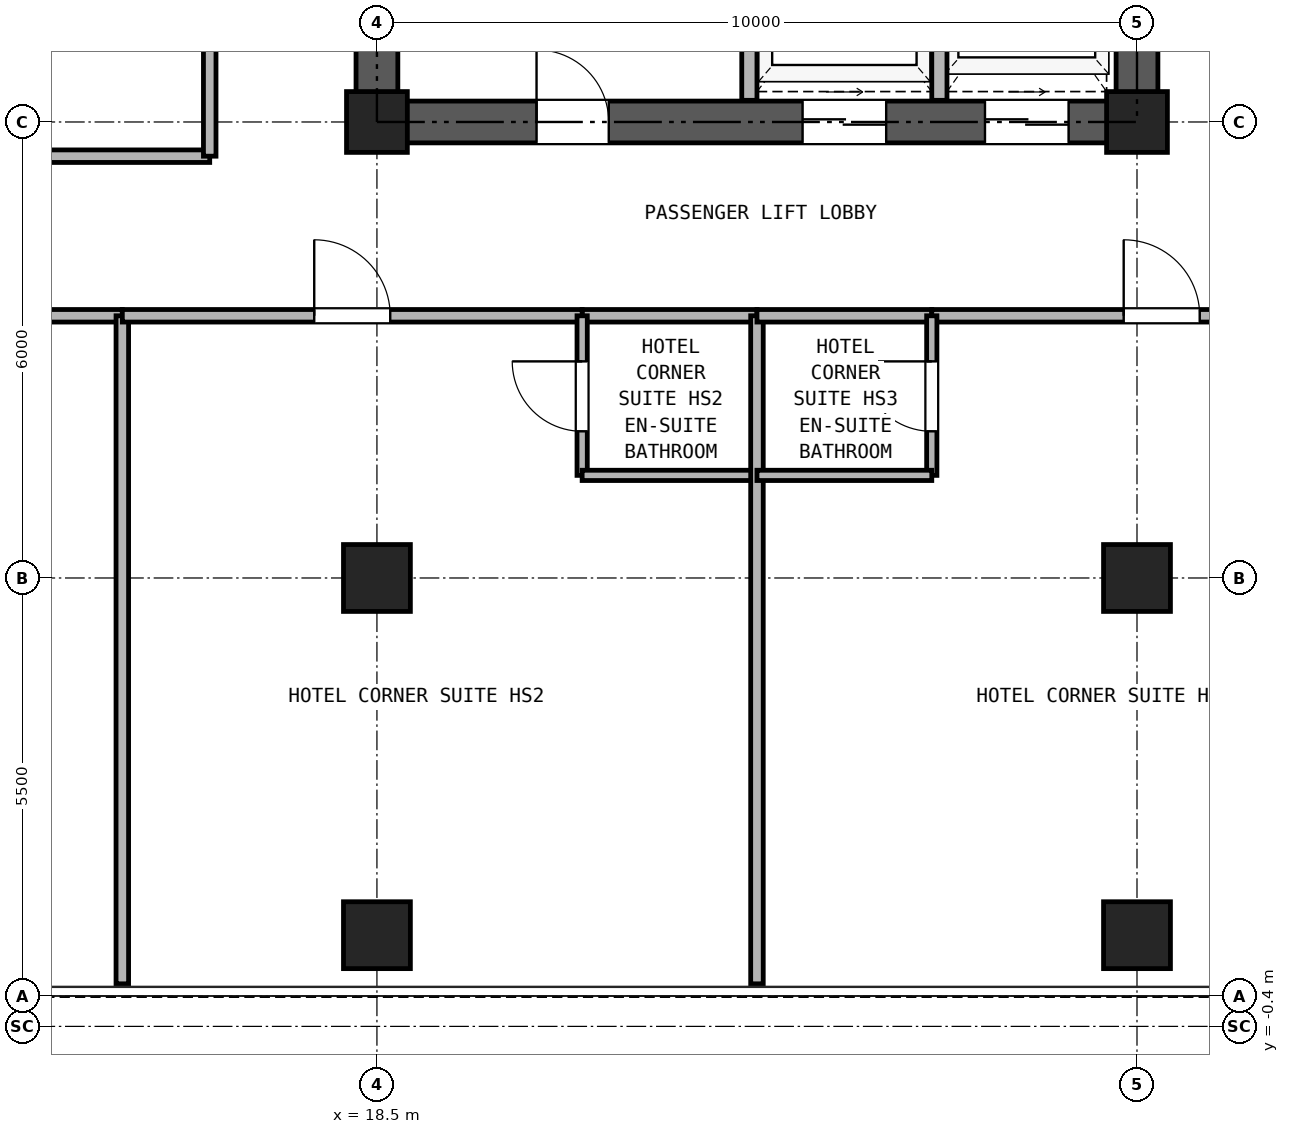
"""IFC4 building model, lengths in metres.
Left out: names, types, materials, properties, quantities, classifications, styles, units other than length and angle.
Written with IfcOpenShell. Run it as: python <this file> out.ifc"""

import sys

from ifc_helpers import new_model, si_unit, direction, frame, frame_2d, origin, origin_2d, place, context, subcontext, project, spatial, rectangle, hollow_rectangle, extrude, source, transform, mapped, element, fill, save


model = new_model("IFC4")
c1 = context("Model", 3, precision=1e-05, world=origin(), true_north=direction((0.0, 1.0)))
c2 = subcontext(c1, "Body", "Model", "MODEL_VIEW")
j1 = project(units=[si_unit("LENGTHUNIT", "METRE"), si_unit("PLANEANGLEUNIT", "RADIAN")], contexts=[c1])
p1 = place(None, origin())
s1 = spatial("IfcSite", under=j1, at=p1, CompositionType="ELEMENT")
p2 = place(p1, origin())
s2 = spatial("IfcBuilding", under=s1, at=p2, CompositionType="ELEMENT")
p3 = place(p2, frame((0.0, 0.0, 95.9)))
s3 = spatial("IfcBuildingStorey", under=s2, at=p3, CompositionType="ELEMENT", Elevation=95.9)
m1 = source(origin(), c2, "Body", "SweptSolid", [
    extrude(hollow_rectangle(XDim=0.88, YDim=0.88, WallThickness=0.05, at=origin_2d()), origin(), (0.0, 0.0, 1.0), 2.95),
])
for number, where, z_axis, x_axis in (
    (1, (18.5, 0.8, 0.0), (0.0, 0.0, 1.0), (1.0, 0.0, 0.0)),
    (2, (28.5, 0.8, 0.0), (0.0, 0.0, 1.0), (1.0, 0.0, 0.0)),
    (3, (18.5, 5.5, 0.0), (0.0, 0.0, 1.0), (1.0, 0.0, 0.0)),
):
    element("IfcColumn", number, at=place(p3, frame(where, z_axis=z_axis, x_axis=x_axis)), inside=s3, PredefinedType="COLUMN", context=c2, shape_type="MappedRepresentation", body=[
        mapped(m1, transform((0.0, 0.0, 0.0), x_axis=(1.0, 0.0, 0.0), y_axis=(0.0, 1.0, 0.0), z_axis=(0.0, 0.0, 1.0), scale=1.0)),
    ])
m2 = source(origin(), c2, "Body", "SweptSolid", [
    extrude(hollow_rectangle(XDim=0.8, YDim=0.8, WallThickness=0.045, at=origin_2d()), origin(), (0.0, 0.0, 1.0), 2.95),
])
p4 = place(p3, frame((18.5, 11.5, 0.0), z_axis=(0.0, 0.0, 1.0), x_axis=(1.0, 0.0, 0.0)))
e4 = element("IfcColumn", 4, at=p4, inside=s3, PredefinedType="COLUMN", context=c2, shape_type="MappedRepresentation", body=[
    mapped(m2, transform((0.0, 0.0, 0.0), x_axis=(1.0, 0.0, 0.0), y_axis=(0.0, 1.0, 0.0), z_axis=(0.0, 0.0, 1.0), scale=1.0)),
])
p5 = place(p3, frame((28.5, 5.5, 0.0), z_axis=(0.0, 0.0, 1.0), x_axis=(1.0, 0.0, 0.0)))
e5 = element("IfcColumn", 5, at=p5, inside=s3, PredefinedType="COLUMN", context=c2, shape_type="MappedRepresentation", body=[
    mapped(m1, transform((0.0, 0.0, 0.0), x_axis=(1.0, 0.0, 0.0), y_axis=(0.0, 1.0, 0.0), z_axis=(0.0, 0.0, 1.0), scale=1.0)),
])
p6 = place(p3, frame((28.5, 11.5, 0.0), z_axis=(0.0, 0.0, 1.0), x_axis=(1.0, 0.0, 0.0)))
e6 = element("IfcColumn", 6, at=p6, inside=s3, PredefinedType="COLUMN", context=c2, shape_type="MappedRepresentation", body=[
    mapped(m2, transform((0.0, 0.0, 0.0), x_axis=(1.0, 0.0, 0.0), y_axis=(0.0, 1.0, 0.0), z_axis=(0.0, 0.0, 1.0), scale=1.0)),
])
p7 = place(p3, frame((18.225, 11.5, 0.0), z_axis=(0.0, 0.0, 1.0), x_axis=(1.0, 0.0, 0.0)))
e7 = element("IfcWall", 7, at=p7, inside=s3, PredefinedType="SHEAR", context=c2, shape_type="SweptSolid", body=[
    extrude(rectangle(XDim=10.55, YDim=0.55, at=frame_2d((5.275, 0.0))), origin(), (0.0, 0.0, 1.0), 2.95),
])
p8 = place(p7, frame((2.375, 0.0, 0.0)))
e8 = element("IfcOpeningElement", 8, at=p8, cuts=e7, PredefinedType="OPENING", context=c2, shape_type="SweptSolid", body=[
    extrude(rectangle(XDim=0.95, YDim=2.15, at=frame_2d((0.475, 1.075))), frame((0.0, 0.285, 0.0), z_axis=(0.0, -1.0, 0.0), x_axis=(1.0, 0.0, 0.0)), (0.0, 0.0, 1.0), 0.57),
])
p9 = place(p7, frame((5.875, 0.0, 0.0)))
e9 = element("IfcOpeningElement", 9, at=p9, cuts=e7, PredefinedType="OPENING", context=c2, shape_type="SweptSolid", body=[
    extrude(rectangle(XDim=1.1, YDim=2.25, at=frame_2d((0.55, 1.125))), frame((0.0, 0.285, 0.0), z_axis=(0.0, -1.0, 0.0), x_axis=(1.0, 0.0, 0.0)), (0.0, 0.0, 1.0), 0.57),
])
p10 = place(p7, frame((8.275, 0.0, 0.0)))
e10 = element("IfcOpeningElement", 10, at=p10, cuts=e7, PredefinedType="OPENING", context=c2, shape_type="SweptSolid", body=[
    extrude(rectangle(XDim=1.1, YDim=2.25, at=frame_2d((0.55, 1.125))), frame((0.0, 0.285, 0.0), z_axis=(0.0, -1.0, 0.0), x_axis=(1.0, 0.0, 0.0)), (0.0, 0.0, 1.0), 0.57),
])
p11 = place(p3, frame((18.5, 11.775, 0.0), z_axis=(0.0, 0.0, 1.0), x_axis=(0.0, 1.0, 0.0)))
e11 = element("IfcWall", 11, at=p11, inside=s3, PredefinedType="SHEAR", context=c2, shape_type="SweptSolid", body=[
    extrude(rectangle(XDim=16.7, YDim=0.55, at=frame_2d((8.35, 0.0))), origin(), (0.0, 0.0, 1.0), 2.95),
])
p12 = place(p11, frame((7.375, 0.0, 0.0)))
e12 = element("IfcOpeningElement", 12, at=p12, cuts=e11, PredefinedType="OPENING", context=c2, shape_type="SweptSolid", body=[
    extrude(rectangle(XDim=1.15, YDim=2.2, at=frame_2d((0.575, 1.1))), frame((0.0, 0.285, 0.0), z_axis=(0.0, -1.0, 0.0), x_axis=(1.0, 0.0, 0.0)), (0.0, 0.0, 1.0), 0.57),
])
p13 = place(p3, frame((28.5, 11.775, 0.0), z_axis=(0.0, 0.0, 1.0), x_axis=(0.0, 1.0, 0.0)))
e13 = element("IfcWall", 13, at=p13, inside=s3, PredefinedType="SHEAR", context=c2, shape_type="SweptSolid", body=[
    extrude(rectangle(XDim=16.7, YDim=0.55, at=frame_2d((8.35, 0.0))), origin(), (0.0, 0.0, 1.0), 2.95),
])
p14 = place(p13, frame((7.375, 0.0, 0.0)))
e14 = element("IfcOpeningElement", 14, at=p14, cuts=e13, PredefinedType="OPENING", context=c2, shape_type="SweptSolid", body=[
    extrude(rectangle(XDim=1.15, YDim=2.2, at=frame_2d((0.575, 1.1))), frame((0.0, 0.285, 0.0), z_axis=(0.0, -1.0, 0.0), x_axis=(1.0, 0.0, 0.0)), (0.0, 0.0, 1.0), 0.57),
])
for number, where, z_axis, x_axis in (
    (15, (23.4, 11.785, 0.0), (0.0, 0.0, 1.0), (0.0, 1.0, 0.0)),
    (16, (25.9, 11.785, 0.0), (0.0, 0.0, 1.0), (0.0, 1.0, 0.0)),
):
    element("IfcWall", number, at=place(p3, frame(where, z_axis=z_axis, x_axis=x_axis)), inside=s3, PredefinedType="PARTITIONING", context=c2, shape_type="SweptSolid", body=[
        extrude(rectangle(XDim=3.215, YDim=0.2, at=frame_2d((1.607, 0.0))), origin(), (0.0, 0.0, 1.0), 2.95),
    ])
p15 = place(p3, frame((6.8, 11.05, 0.0), z_axis=(0.0, 0.0, 1.0), x_axis=(1.0, 0.0, 0.0)))
e17 = element("IfcWall", 17, at=p15, inside=s3, PredefinedType="PARTITIONING", context=c2, shape_type="SweptSolid", body=[
    extrude(rectangle(XDim=9.5, YDim=0.165, at=frame_2d((4.75, 0.0))), origin(), (0.0, 0.0, 1.0), 2.95),
])
p16 = place(p3, frame((16.3, 11.05, 0.0), z_axis=(0.0, 0.0, 1.0), x_axis=(0.0, 1.0, 0.0)))
e18 = element("IfcWall", 18, at=p16, inside=s3, PredefinedType="PARTITIONING", context=c2, shape_type="SweptSolid", body=[
    extrude(rectangle(XDim=18.25, YDim=0.165, at=frame_2d((9.125, 0.0))), origin(), (0.0, 0.0, 1.0), 2.95),
])
p17 = place(p16, frame((4.062, 0.0, 0.0)))
e19 = element("IfcOpeningElement", 19, at=p17, cuts=e18, PredefinedType="OPENING", context=c2, shape_type="SweptSolid", body=[
    extrude(rectangle(XDim=0.95, YDim=2.15, at=frame_2d((0.475, 1.075))), frame((0.0, 0.093, 0.0), z_axis=(0.0, -1.0, 0.0), x_axis=(1.0, 0.0, 0.0)), (0.0, 0.0, 1.0), 0.185),
])
p18 = place(p16, frame((13.187, 0.0, 0.0)))
e20 = element("IfcOpeningElement", 20, at=p18, cuts=e18, PredefinedType="OPENING", context=c2, shape_type="SweptSolid", body=[
    extrude(rectangle(XDim=0.95, YDim=2.15, at=frame_2d((0.475, 1.075))), frame((0.0, 0.093, 0.0), z_axis=(0.0, -1.0, 0.0), x_axis=(1.0, 0.0, 0.0)), (0.0, 0.0, 1.0), 0.185),
])
p19 = place(p3, frame((9.1, 8.95, 0.0), z_axis=(0.0, 0.0, 1.0), x_axis=(1.0, 0.0, 0.0)))
e21 = element("IfcWall", 21, at=p19, inside=s3, PredefinedType="PARTITIONING", context=c2, shape_type="SweptSolid", body=[
    extrude(rectangle(XDim=6.05, YDim=0.165, at=frame_2d((3.025, 0.0))), origin(), (0.0, 0.0, 1.0), 2.95),
])
p20 = place(p19, frame((2.525, 0.0, 0.0)))
e22 = element("IfcOpeningElement", 22, at=p20, cuts=e21, PredefinedType="OPENING", context=c2, shape_type="SweptSolid", body=[
    extrude(rectangle(XDim=1.0, YDim=2.15, at=frame_2d((0.5, 1.075))), frame((0.0, 0.093, 0.0), z_axis=(0.0, -1.0, 0.0), x_axis=(1.0, 0.0, 0.0)), (0.0, 0.0, 1.0), 0.185),
])
p21 = place(p3, frame((15.15, 0.16, 0.0), z_axis=(0.0, 0.0, 1.0), x_axis=(0.0, 1.0, 0.0)))
e23 = element("IfcWall", 23, at=p21, inside=s3, PredefinedType="PARTITIONING", context=c2, shape_type="SweptSolid", body=[
    extrude(rectangle(XDim=8.79, YDim=0.165, at=frame_2d((4.395, 0.0))), origin(), (0.0, 0.0, 1.0), 2.95),
])
p22 = place(p3, frame((21.2, 8.95, 0.0), z_axis=(0.0, 0.0, 1.0), x_axis=(1.0, 0.0, 0.0)))
e24 = element("IfcWall", 24, at=p22, inside=s3, PredefinedType="PARTITIONING", context=c2, shape_type="SweptSolid", body=[
    extrude(rectangle(XDim=2.3, YDim=0.165, at=frame_2d((1.15, 0.0))), origin(), (0.0, 0.0, 1.0), 2.95),
])
p23 = place(p3, frame((15.15, 8.95, 0.0), z_axis=(0.0, 0.0, 1.0), x_axis=(1.0, 0.0, 0.0)))
e25 = element("IfcWall", 25, at=p23, inside=s3, PredefinedType="PARTITIONING", context=c2, shape_type="SweptSolid", body=[
    extrude(rectangle(XDim=6.05, YDim=0.165, at=frame_2d((3.025, 0.0))), origin(), (0.0, 0.0, 1.0), 2.95),
])
p24 = place(p23, frame((2.525, 0.0, 0.0)))
e26 = element("IfcOpeningElement", 26, at=p24, cuts=e25, PredefinedType="OPENING", context=c2, shape_type="SweptSolid", body=[
    extrude(rectangle(XDim=1.0, YDim=2.15, at=frame_2d((0.5, 1.075))), frame((0.0, 0.093, 0.0), z_axis=(0.0, -1.0, 0.0), x_axis=(1.0, 0.0, 0.0)), (0.0, 0.0, 1.0), 0.185),
])
p25 = place(p3, frame((21.2, 6.85, 0.0), z_axis=(0.0, 0.0, 1.0), x_axis=(0.0, 1.0, 0.0)))
e27 = element("IfcWall", 27, at=p25, inside=s3, PredefinedType="PARTITIONING", context=c2, shape_type="SweptSolid", body=[
    extrude(rectangle(XDim=2.1, YDim=0.135, at=frame_2d((1.05, 0.0))), origin(), (0.0, 0.0, 1.0), 2.95),
])
p26 = place(p25, frame((0.58, 0.0, 0.0)))
e28 = element("IfcOpeningElement", 28, at=p26, cuts=e27, PredefinedType="OPENING", context=c2, shape_type="SweptSolid", body=[
    extrude(rectangle(XDim=0.92, YDim=2.1, at=frame_2d((0.46, 1.05))), frame((0.0, 0.077, 0.0), z_axis=(0.0, -1.0, 0.0), x_axis=(1.0, 0.0, 0.0)), (0.0, 0.0, 1.0), 0.155),
])
p27 = place(p3, frame((21.2, 6.85, 0.0), z_axis=(0.0, 0.0, 1.0), x_axis=(1.0, 0.0, 0.0)))
e29 = element("IfcWall", 29, at=p27, inside=s3, PredefinedType="PARTITIONING", context=c2, shape_type="SweptSolid", body=[
    extrude(rectangle(XDim=2.3, YDim=0.135, at=frame_2d((1.15, 0.0))), origin(), (0.0, 0.0, 1.0), 2.95),
])
p28 = place(p3, frame((23.5, 0.16, 0.0), z_axis=(0.0, 0.0, 1.0), x_axis=(0.0, 1.0, 0.0)))
e30 = element("IfcWall", 30, at=p28, inside=s3, PredefinedType="PARTITIONING", context=c2, shape_type="SweptSolid", body=[
    extrude(rectangle(XDim=8.79, YDim=0.165, at=frame_2d((4.395, 0.0))), origin(), (0.0, 0.0, 1.0), 2.95),
])
p29 = place(p3, frame((23.5, 8.95, 0.0), z_axis=(0.0, 0.0, 1.0), x_axis=(1.0, 0.0, 0.0)))
e31 = element("IfcWall", 31, at=p29, inside=s3, PredefinedType="PARTITIONING", context=c2, shape_type="SweptSolid", body=[
    extrude(rectangle(XDim=2.3, YDim=0.165, at=frame_2d((1.15, 0.0))), origin(), (0.0, 0.0, 1.0), 2.95),
])
p30 = place(p3, frame((25.8, 8.95, 0.0), z_axis=(0.0, 0.0, 1.0), x_axis=(1.0, 0.0, 0.0)))
e32 = element("IfcWall", 32, at=p30, inside=s3, PredefinedType="PARTITIONING", context=c2, shape_type="SweptSolid", body=[
    extrude(rectangle(XDim=6.05, YDim=0.165, at=frame_2d((3.025, 0.0))), origin(), (0.0, 0.0, 1.0), 2.95),
])
p31 = place(p30, frame((2.525, 0.0, 0.0)))
e33 = element("IfcOpeningElement", 33, at=p31, cuts=e32, PredefinedType="OPENING", context=c2, shape_type="SweptSolid", body=[
    extrude(rectangle(XDim=1.0, YDim=2.15, at=frame_2d((0.5, 1.075))), frame((0.0, 0.093, 0.0), z_axis=(0.0, -1.0, 0.0), x_axis=(1.0, 0.0, 0.0)), (0.0, 0.0, 1.0), 0.185),
])
p32 = place(p3, frame((25.8, 6.85, 0.0), z_axis=(0.0, 0.0, 1.0), x_axis=(0.0, 1.0, 0.0)))
e34 = element("IfcWall", 34, at=p32, inside=s3, PredefinedType="PARTITIONING", context=c2, shape_type="SweptSolid", body=[
    extrude(rectangle(XDim=2.1, YDim=0.135, at=frame_2d((1.05, 0.0))), origin(), (0.0, 0.0, 1.0), 2.95),
])
p33 = place(p32, frame((0.58, 0.0, 0.0)))
e35 = element("IfcOpeningElement", 35, at=p33, cuts=e34, PredefinedType="OPENING", context=c2, shape_type="SweptSolid", body=[
    extrude(rectangle(XDim=0.92, YDim=2.1, at=frame_2d((0.46, 1.05))), frame((0.0, 0.077, 0.0), z_axis=(0.0, -1.0, 0.0), x_axis=(1.0, 0.0, 0.0)), (0.0, 0.0, 1.0), 0.155),
])
p34 = place(p3, frame((23.5, 6.85, 0.0), z_axis=(0.0, 0.0, 1.0), x_axis=(1.0, 0.0, 0.0)))
e36 = element("IfcWall", 36, at=p34, inside=s3, PredefinedType="PARTITIONING", context=c2, shape_type="SweptSolid", body=[
    extrude(rectangle(XDim=2.3, YDim=0.135, at=frame_2d((1.15, 0.0))), origin(), (0.0, 0.0, 1.0), 2.95),
])
p35 = place(p8, frame((0.95, 0.0, 0.0), z_axis=(0.0, 0.0, 1.0), x_axis=(-1.0, 0.0, 0.0)))
e37 = element("IfcDoor", 37, at=p35, inside=s3, OperationType="SINGLE_SWING_LEFT", PredefinedType="DOOR", context=c2, shape_type="SweptSolid", body=[
    extrude(rectangle(XDim=0.95, YDim=2.15, at=frame_2d((0.475, 1.075))), frame((0.0, 0.025, 0.0), z_axis=(0.0, -1.0, 0.0), x_axis=(1.0, 0.0, 0.0)), (0.0, 0.0, 1.0), 0.05),
])
fill(e8, e37)
p36 = place(p9, frame((1.1, 0.0, 0.0), z_axis=(0.0, 0.0, 1.0), x_axis=(-1.0, 0.0, 0.0)))
e38 = element("IfcDoor", 38, at=p36, inside=s3, OperationType="DOUBLE_DOOR_SLIDING", PredefinedType="DOOR", context=c2, shape_type="SweptSolid", body=[
    extrude(rectangle(XDim=1.1, YDim=2.25, at=frame_2d((0.55, 1.125))), frame((0.0, 0.025, 0.0), z_axis=(0.0, -1.0, 0.0), x_axis=(1.0, 0.0, 0.0)), (0.0, 0.0, 1.0), 0.05),
])
fill(e9, e38)
p37 = place(p10, frame((1.1, 0.0, 0.0), z_axis=(0.0, 0.0, 1.0), x_axis=(-1.0, 0.0, 0.0)))
e39 = element("IfcDoor", 39, at=p37, inside=s3, OperationType="DOUBLE_DOOR_SLIDING", PredefinedType="DOOR", context=c2, shape_type="SweptSolid", body=[
    extrude(rectangle(XDim=1.1, YDim=2.25, at=frame_2d((0.55, 1.125))), frame((0.0, 0.025, 0.0), z_axis=(0.0, -1.0, 0.0), x_axis=(1.0, 0.0, 0.0)), (0.0, 0.0, 1.0), 0.05),
])
fill(e10, e39)
p38 = place(p26, origin())
e40 = element("IfcDoor", 40, at=p38, inside=s3, OperationType="SINGLE_SWING_RIGHT", PredefinedType="DOOR", context=c2, shape_type="SweptSolid", body=[
    extrude(rectangle(XDim=0.92, YDim=2.1, at=frame_2d((0.46, 1.05))), frame((0.0, 0.025, 0.0), z_axis=(0.0, -1.0, 0.0), x_axis=(1.0, 0.0, 0.0)), (0.0, 0.0, 1.0), 0.05),
])
fill(e28, e40)
p39 = place(p24, frame((1.0, 0.0, 0.0), z_axis=(0.0, 0.0, 1.0), x_axis=(-1.0, 0.0, 0.0)))
e41 = element("IfcDoor", 41, at=p39, inside=s3, OperationType="SINGLE_SWING_LEFT", PredefinedType="DOOR", context=c2, shape_type="SweptSolid", body=[
    extrude(rectangle(XDim=1.0, YDim=2.15, at=frame_2d((0.5, 1.075))), frame((0.0, 0.025, 0.0), z_axis=(0.0, -1.0, 0.0), x_axis=(1.0, 0.0, 0.0)), (0.0, 0.0, 1.0), 0.05),
])
fill(e26, e41)
p40 = place(p33, frame((0.92, 0.0, 0.0), z_axis=(0.0, 0.0, 1.0), x_axis=(-1.0, 0.0, 0.0)))
e42 = element("IfcDoor", 42, at=p40, inside=s3, OperationType="SINGLE_SWING_RIGHT", PredefinedType="DOOR", context=c2, shape_type="SweptSolid", body=[
    extrude(rectangle(XDim=0.92, YDim=2.1, at=frame_2d((0.46, 1.05))), frame((0.0, 0.025, 0.0), z_axis=(0.0, -1.0, 0.0), x_axis=(1.0, 0.0, 0.0)), (0.0, 0.0, 1.0), 0.05),
])
fill(e35, e42)
p41 = place(p31, frame((1.0, 0.0, 0.0), z_axis=(0.0, 0.0, 1.0), x_axis=(-1.0, 0.0, 0.0)))
e43 = element("IfcDoor", 43, at=p41, inside=s3, OperationType="SINGLE_SWING_LEFT", PredefinedType="DOOR", context=c2, shape_type="SweptSolid", body=[
    extrude(rectangle(XDim=1.0, YDim=2.15, at=frame_2d((0.5, 1.075))), frame((0.0, 0.025, 0.0), z_axis=(0.0, -1.0, 0.0), x_axis=(1.0, 0.0, 0.0)), (0.0, 0.0, 1.0), 0.05),
])
fill(e33, e43)
save(model, sys.argv[1])
